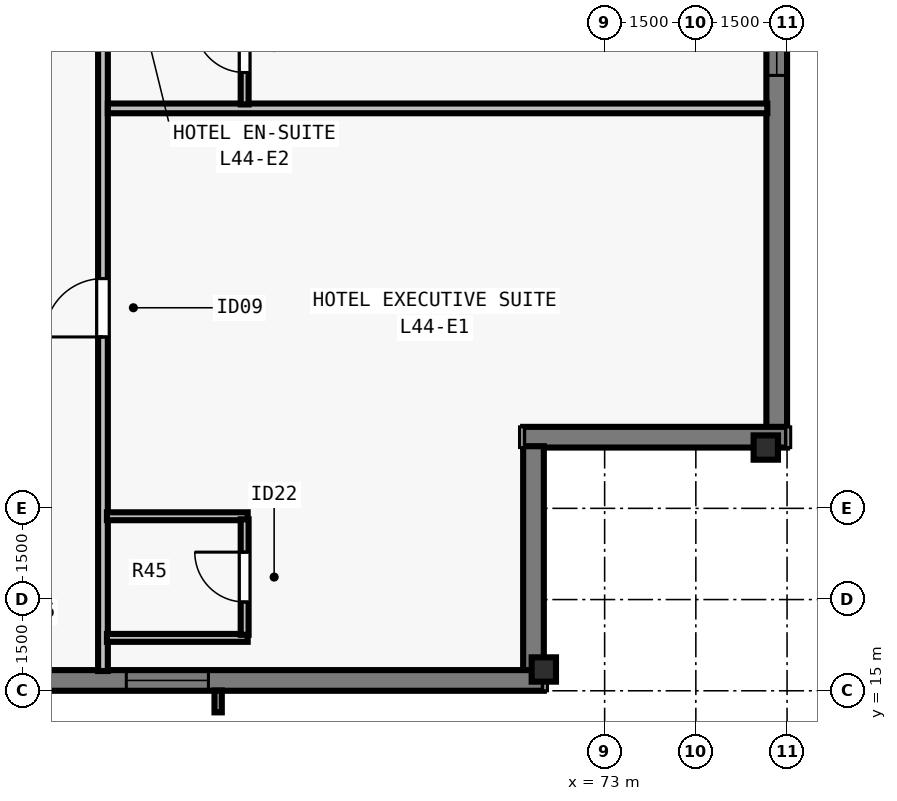
"""IFC4 building model, lengths in metres.
Left out: names, types, materials, properties, quantities, classifications, styles, units other than length and angle.
Written with IfcOpenShell. Run it as: python <this file> out.ifc"""

import sys

from ifc_helpers import new_model, si_unit, direction, frame, frame_2d, origin, origin_2d, place, context, subcontext, project, spatial, rectangle, i_section, extrude, element, fill, save


model = new_model("IFC4")
c1 = context("Model", 3, precision=1e-05, world=origin(), true_north=direction((0.0, 1.0)))
c2 = subcontext(c1, "Body", "Model", "MODEL_VIEW")
j1 = project(units=[si_unit("LENGTHUNIT", "METRE"), si_unit("PLANEANGLEUNIT", "RADIAN")], contexts=[c1])
p1 = place(None, origin())
s1 = spatial("IfcSite", under=j1, at=p1, CompositionType="ELEMENT")
p2 = place(p1, origin())
s2 = spatial("IfcBuilding", under=s1, at=p2, CompositionType="ELEMENT")
p3 = place(p2, frame((0.0, 0.0, 162.0)))
s3 = spatial("IfcBuildingStorey", under=s2, at=p3, CompositionType="ELEMENT", Elevation=162.0)
for number, where, z_axis, x_axis in (
    (1, (72.0, 15.35, 0.0), (0.0, 0.0, 1.0), (1.0, 0.0, 0.0)),
    (2, (75.65, 19.0, 0.0), (0.0, 0.0, 1.0), (0.0, 1.0, 0.0)),
):
    element("IfcColumn", number, at=place(p3, frame(where, z_axis=z_axis, x_axis=x_axis)), inside=s3, PredefinedType="COLUMN", context=c2, shape_type="SweptSolid", body=[
        extrude(i_section(OverallWidth=0.4, OverallDepth=0.4, WebThickness=0.022, FlangeThickness=0.036, at=origin_2d()), origin(), (0.0, 0.0, 1.0), 3.5),
    ])
p4 = place(p3, frame((75.83, 59.0, 0.0), z_axis=(0.0, 0.0, 1.0), x_axis=(0.0, -1.0, 0.0)))
e3 = element("IfcWall", 3, at=p4, inside=s3, PredefinedType="SOLIDWALL", context=c2, shape_type="SweptSolid", body=[
    extrude(rectangle(XDim=39.682, YDim=0.34, at=frame_2d((19.841, 0.0))), origin(), (0.0, 0.0, 1.0), 3.28),
])
p5 = place(p4, frame((6.202, 0.0, 0.8)))
e4 = element("IfcOpeningElement", 4, at=p5, cuts=e3, PredefinedType="OPENING", context=c2, shape_type="SweptSolid", body=[
    extrude(rectangle(XDim=1.35, YDim=1.66, at=frame_2d((0.675, 0.83))), frame((0.0, 0.18, 0.0), z_axis=(0.0, -1.0, 0.0), x_axis=(1.0, 0.0, 0.0)), (0.0, 0.0, 1.0), 0.36),
])
p6 = place(p4, frame((8.305, 0.0, 0.8)))
e5 = element("IfcOpeningElement", 5, at=p6, cuts=e3, PredefinedType="OPENING", context=c2, shape_type="SweptSolid", body=[
    extrude(rectangle(XDim=1.75, YDim=1.66, at=frame_2d((0.875, 0.83))), frame((0.0, 0.18, 0.0), z_axis=(0.0, -1.0, 0.0), x_axis=(1.0, 0.0, 0.0)), (0.0, 0.0, 1.0), 0.36),
])
p7 = place(p4, frame((12.059, 0.0, 0.8)))
e6 = element("IfcOpeningElement", 6, at=p7, cuts=e3, PredefinedType="OPENING", context=c2, shape_type="SweptSolid", body=[
    extrude(rectangle(XDim=1.35, YDim=1.66, at=frame_2d((0.675, 0.83))), frame((0.0, 0.18, 0.0), z_axis=(0.0, -1.0, 0.0), x_axis=(1.0, 0.0, 0.0)), (0.0, 0.0, 1.0), 0.36),
])
p8 = place(p4, frame((16.262, 0.0, 0.8)))
e7 = element("IfcOpeningElement", 7, at=p8, cuts=e3, PredefinedType="OPENING", context=c2, shape_type="SweptSolid", body=[
    extrude(rectangle(XDim=1.75, YDim=1.66, at=frame_2d((0.875, 0.83))), frame((0.0, 0.18, 0.0), z_axis=(0.0, -1.0, 0.0), x_axis=(1.0, 0.0, 0.0)), (0.0, 0.0, 1.0), 0.36),
])
p9 = place(p4, frame((19.166, 0.0, 0.8)))
e8 = element("IfcOpeningElement", 8, at=p9, cuts=e3, PredefinedType="OPENING", context=c2, shape_type="SweptSolid", body=[
    extrude(rectangle(XDim=1.35, YDim=1.66, at=frame_2d((0.675, 0.83))), frame((0.0, 0.18, 0.0), z_axis=(0.0, -1.0, 0.0), x_axis=(1.0, 0.0, 0.0)), (0.0, 0.0, 1.0), 0.36),
])
p10 = place(p4, frame((22.07, 0.0, 0.8)))
e9 = element("IfcOpeningElement", 9, at=p10, cuts=e3, PredefinedType="OPENING", context=c2, shape_type="SweptSolid", body=[
    extrude(rectangle(XDim=1.75, YDim=1.66, at=frame_2d((0.875, 0.83))), frame((0.0, 0.18, 0.0), z_axis=(0.0, -1.0, 0.0), x_axis=(1.0, 0.0, 0.0)), (0.0, 0.0, 1.0), 0.36),
])
p11 = place(p4, frame((26.273, 0.0, 0.8)))
e10 = element("IfcOpeningElement", 10, at=p11, cuts=e3, PredefinedType="OPENING", context=c2, shape_type="SweptSolid", body=[
    extrude(rectangle(XDim=1.35, YDim=1.66, at=frame_2d((0.675, 0.83))), frame((0.0, 0.18, 0.0), z_axis=(0.0, -1.0, 0.0), x_axis=(1.0, 0.0, 0.0)), (0.0, 0.0, 1.0), 0.36),
])
p12 = place(p4, frame((29.627, 0.0, 0.8)))
e11 = element("IfcOpeningElement", 11, at=p12, cuts=e3, PredefinedType="OPENING", context=c2, shape_type="SweptSolid", body=[
    extrude(rectangle(XDim=1.75, YDim=1.66, at=frame_2d((0.875, 0.83))), frame((0.0, 0.18, 0.0), z_axis=(0.0, -1.0, 0.0), x_axis=(1.0, 0.0, 0.0)), (0.0, 0.0, 1.0), 0.36),
])
p13 = place(p4, frame((32.53, 0.0, 0.8)))
e12 = element("IfcOpeningElement", 12, at=p13, cuts=e3, PredefinedType="OPENING", context=c2, shape_type="SweptSolid", body=[
    extrude(rectangle(XDim=1.35, YDim=1.66, at=frame_2d((0.675, 0.83))), frame((0.0, 0.18, 0.0), z_axis=(0.0, -1.0, 0.0), x_axis=(1.0, 0.0, 0.0)), (0.0, 0.0, 1.0), 0.36),
])
p14 = place(p3, frame((76.0, 19.17, 0.0), z_axis=(0.0, 0.0, 1.0), x_axis=(-1.0, 0.0, 0.0)))
e13 = element("IfcWall", 13, at=p14, inside=s3, PredefinedType="SOLIDWALL", context=c2, shape_type="SweptSolid", body=[
    extrude(rectangle(XDim=4.34, YDim=0.34, at=frame_2d((2.17, 0.0))), origin(), (0.0, 0.0, 1.0), 3.28),
])
p15 = place(p3, frame((71.83, 19.022, 0.0), z_axis=(0.0, 0.0, 1.0), x_axis=(0.0, -1.0, 0.0)))
e14 = element("IfcWall", 14, at=p15, inside=s3, PredefinedType="SOLIDWALL", context=c2, shape_type="SweptSolid", body=[
    extrude(rectangle(XDim=3.704, YDim=0.34, at=frame_2d((1.852, 0.0))), origin(), (0.0, 0.0, 1.0), 3.28),
])
p16 = place(p3, frame((72.0, 15.17, 0.0), z_axis=(0.0, 0.0, 1.0), x_axis=(-1.0, 0.0, 0.0)))
e15 = element("IfcWall", 15, at=p16, inside=s3, PredefinedType="SOLIDWALL", context=c2, shape_type="SweptSolid", body=[
    extrude(rectangle(XDim=8.882, YDim=0.34, at=frame_2d((4.441, 0.0))), origin(), (0.0, 0.0, 1.0), 3.28),
])
p17 = place(p16, frame((5.516, 0.0, 0.8)))
e16 = element("IfcOpeningElement", 16, at=p17, cuts=e15, PredefinedType="OPENING", context=c2, shape_type="SweptSolid", body=[
    extrude(rectangle(XDim=1.35, YDim=1.66, at=frame_2d((0.675, 0.83))), frame((0.0, 0.18, 0.0), z_axis=(0.0, -1.0, 0.0), x_axis=(1.0, 0.0, 0.0)), (0.0, 0.0, 1.0), 0.36),
])
p18 = place(p3, frame((64.75, 15.325, 0.0), z_axis=(0.0, 0.0, 1.0), x_axis=(0.0, 1.0, 0.0)))
e17 = element("IfcWall", 17, at=p18, inside=s3, PredefinedType="PARTITIONING", context=c2, shape_type="SweptSolid", body=[
    extrude(rectangle(XDim=47.35, YDim=0.16, at=frame_2d((23.675, 0.0))), origin(), (0.0, 0.0, 1.0), 2.555),
])
p19 = place(p18, frame((5.494, 0.0, 0.0)))
e18 = element("IfcOpeningElement", 18, at=p19, cuts=e17, PredefinedType="OPENING", context=c2, shape_type="SweptSolid", body=[
    extrude(rectangle(XDim=0.96, YDim=2.15, at=frame_2d((0.48, 1.075))), frame((0.0, 0.09, 0.0), z_axis=(0.0, -1.0, 0.0), x_axis=(1.0, 0.0, 0.0)), (0.0, 0.0, 1.0), 0.18),
])
p20 = place(p18, frame((14.796, 0.0, 0.0)))
e19 = element("IfcOpeningElement", 19, at=p20, cuts=e17, PredefinedType="OPENING", context=c2, shape_type="SweptSolid", body=[
    extrude(rectangle(XDim=0.96, YDim=2.15, at=frame_2d((0.48, 1.075))), frame((0.0, 0.09, 0.0), z_axis=(0.0, -1.0, 0.0), x_axis=(1.0, 0.0, 0.0)), (0.0, 0.0, 1.0), 0.18),
])
p21 = place(p18, frame((24.228, 0.0, 0.0)))
e20 = element("IfcOpeningElement", 20, at=p21, cuts=e17, PredefinedType="OPENING", context=c2, shape_type="SweptSolid", body=[
    extrude(rectangle(XDim=0.96, YDim=2.15, at=frame_2d((0.48, 1.075))), frame((0.0, 0.09, 0.0), z_axis=(0.0, -1.0, 0.0), x_axis=(1.0, 0.0, 0.0)), (0.0, 0.0, 1.0), 0.18),
])
p22 = place(p18, frame((33.66, 0.0, 0.0)))
e21 = element("IfcOpeningElement", 21, at=p22, cuts=e17, PredefinedType="OPENING", context=c2, shape_type="SweptSolid", body=[
    extrude(rectangle(XDim=0.96, YDim=2.15, at=frame_2d((0.48, 1.075))), frame((0.0, 0.09, 0.0), z_axis=(0.0, -1.0, 0.0), x_axis=(1.0, 0.0, 0.0)), (0.0, 0.0, 1.0), 0.18),
])
p23 = place(p18, frame((43.229, 0.0, 0.0)))
e22 = element("IfcOpeningElement", 22, at=p23, cuts=e17, PredefinedType="OPENING", context=c2, shape_type="SweptSolid", body=[
    extrude(rectangle(XDim=0.96, YDim=2.15, at=frame_2d((0.48, 1.075))), frame((0.0, 0.09, 0.0), z_axis=(0.0, -1.0, 0.0), x_axis=(1.0, 0.0, 0.0)), (0.0, 0.0, 1.0), 0.18),
])
for number, where, z_axis, x_axis in (
    (23, (64.815, 15.87, 0.0), (0.0, 0.0, 1.0), (1.0, 0.0, 0.0)),
    (24, (64.815, 17.87, 0.0), (0.0, 0.0, 1.0), (1.0, 0.0, 0.0)),
):
    element("IfcWall", number, at=place(p3, frame(where, z_axis=z_axis, x_axis=x_axis)), inside=s3, PredefinedType="PLUMBINGWALL", context=c2, shape_type="SweptSolid", body=[
        extrude(rectangle(XDim=2.315, YDim=0.13, at=frame_2d((1.157, 0.0))), origin(), (0.0, 0.0, 1.0), 3.28),
    ])
p24 = place(p3, frame((67.08, 15.92, 0.0), z_axis=(0.0, 0.0, 1.0), x_axis=(0.0, 1.0, 0.0)))
e25 = element("IfcWall", 25, at=p24, inside=s3, PredefinedType="PLUMBINGWALL", context=c2, shape_type="SweptSolid", body=[
    extrude(rectangle(XDim=1.9, YDim=0.13, at=frame_2d((0.95, 0.0))), origin(), (0.0, 0.0, 1.0), 3.28),
])
p25 = place(p24, frame((0.54, 0.0, 0.0)))
e26 = element("IfcOpeningElement", 26, at=p25, cuts=e25, PredefinedType="OPENING", context=c2, shape_type="SweptSolid", body=[
    extrude(rectangle(XDim=0.82, YDim=2.1, at=frame_2d((0.41, 1.05))), frame((0.0, 0.075, 0.0), z_axis=(0.0, -1.0, 0.0), x_axis=(1.0, 0.0, 0.0)), (0.0, 0.0, 1.0), 0.15),
])
p26 = place(p3, frame((64.83, 24.577, 0.0), z_axis=(0.0, 0.0, 1.0), x_axis=(1.0, 0.0, 0.0)))
e27 = element("IfcWall", 27, at=p26, inside=s3, PredefinedType="PARTITIONING", context=c2, shape_type="SweptSolid", body=[
    extrude(rectangle(XDim=10.845, YDim=0.16, at=frame_2d((5.422, 0.0))), origin(), (0.0, 0.0, 1.0), 2.896),
])
p27 = place(p3, frame((67.08, 24.642, 0.0), z_axis=(0.0, 0.0, 1.0), x_axis=(0.0, 1.0, 0.0)))
e28 = element("IfcWall", 28, at=p27, inside=s3, PredefinedType="PLUMBINGWALL", context=c2, shape_type="SweptSolid", body=[
    extrude(rectangle(XDim=1.885, YDim=0.13, at=frame_2d((0.942, 0.0))), origin(), (0.0, 0.0, 1.0), 3.28),
])
p28 = place(p27, frame((0.525, 0.0, 0.0)))
e29 = element("IfcOpeningElement", 29, at=p28, cuts=e28, PredefinedType="OPENING", context=c2, shape_type="SweptSolid", body=[
    extrude(rectangle(XDim=0.82, YDim=2.1, at=frame_2d((0.41, 1.05))), frame((0.0, 0.075, 0.0), z_axis=(0.0, -1.0, 0.0), x_axis=(1.0, 0.0, 0.0)), (0.0, 0.0, 1.0), 0.15),
])
p29 = place(p13, origin())
e30 = element("IfcWindow", 30, at=p29, inside=s3, PartitioningType="SINGLE_PANEL", PredefinedType="WINDOW", context=c2, shape_type="SweptSolid", body=[
    extrude(rectangle(XDim=1.35, YDim=1.66, at=frame_2d((0.675, 0.83))), frame((0.0, -0.05, 0.0), z_axis=(0.0, -1.0, 0.0), x_axis=(1.0, 0.0, 0.0)), (0.0, 0.0, 1.0), 0.06),
])
fill(e12, e30)
p30 = place(p17, origin())
e31 = element("IfcWindow", 31, at=p30, inside=s3, PartitioningType="SINGLE_PANEL", PredefinedType="WINDOW", context=c2, shape_type="SweptSolid", body=[
    extrude(rectangle(XDim=1.35, YDim=1.66, at=frame_2d((0.675, 0.83))), frame((0.0, -0.05, 0.0), z_axis=(0.0, -1.0, 0.0), x_axis=(1.0, 0.0, 0.0)), (0.0, 0.0, 1.0), 0.06),
])
fill(e16, e31)
p31 = place(p25, origin())
e32 = element("IfcDoor", 32, at=p31, inside=s3, OperationType="SINGLE_SWING_RIGHT", PredefinedType="DOOR", context=c2, shape_type="SweptSolid", body=[
    extrude(rectangle(XDim=0.82, YDim=2.1, at=frame_2d((0.41, 1.05))), frame((0.0, 0.025, 0.0), z_axis=(0.0, -1.0, 0.0), x_axis=(1.0, 0.0, 0.0)), (0.0, 0.0, 1.0), 0.05),
])
fill(e26, e32)
p32 = place(p19, origin())
e33 = element("IfcDoor", 33, at=p32, inside=s3, OperationType="SINGLE_SWING_LEFT", PredefinedType="DOOR", context=c2, shape_type="SweptSolid", body=[
    extrude(rectangle(XDim=0.96, YDim=2.15, at=frame_2d((0.48, 1.075))), frame((0.0, 0.025, 0.0), z_axis=(0.0, -1.0, 0.0), x_axis=(1.0, 0.0, 0.0)), (0.0, 0.0, 1.0), 0.05),
])
fill(e18, e33)
p33 = place(p28, origin())
e34 = element("IfcDoor", 34, at=p33, inside=s3, OperationType="SINGLE_SWING_RIGHT", PredefinedType="DOOR", context=c2, shape_type="SweptSolid", body=[
    extrude(rectangle(XDim=0.82, YDim=2.1, at=frame_2d((0.41, 1.05))), frame((0.0, 0.025, 0.0), z_axis=(0.0, -1.0, 0.0), x_axis=(1.0, 0.0, 0.0)), (0.0, 0.0, 1.0), 0.05),
])
fill(e29, e34)
save(model, sys.argv[1])
